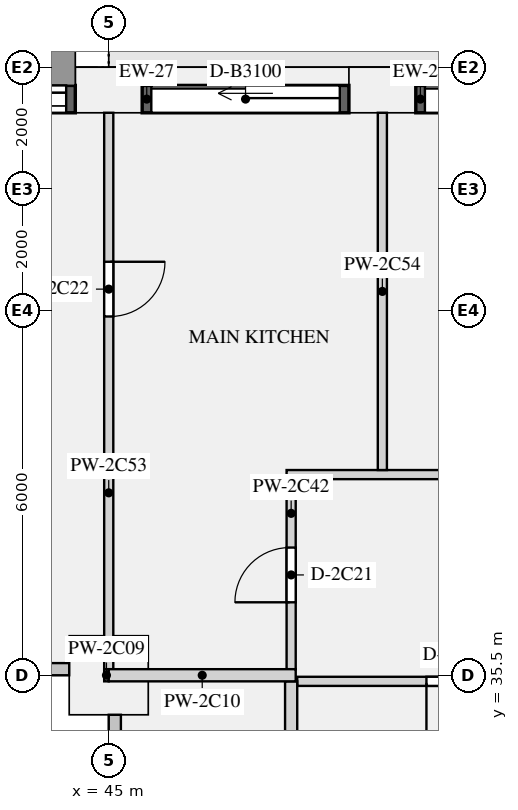
"""IFC4 building model, lengths in metres.
Left out: names, types, materials, properties, quantities, classifications, styles, units other than length and angle.
Written with IfcOpenShell. Run it as: python <this file> out.ifc"""

import sys

from ifc_helpers import new_model, si_unit, direction, frame, frame_2d, origin, origin_2d, place, context, subcontext, project, spatial, rectangle, extrude, element, fill, save


model = new_model("IFC4")
c1 = context("Model", 3, precision=1e-05, world=origin(), true_north=direction((0.0, 1.0)))
c2 = subcontext(c1, "Body", "Model", "MODEL_VIEW")
j1 = project(units=[si_unit("LENGTHUNIT", "METRE"), si_unit("PLANEANGLEUNIT", "RADIAN")], contexts=[c1])
p1 = place(None, origin())
s1 = spatial("IfcSite", under=j1, at=p1, CompositionType="ELEMENT")
p2 = place(p1, origin())
s2 = spatial("IfcBuilding", under=s1, at=p2, CompositionType="ELEMENT")
p3 = place(p2, frame((0.0, 0.0, 102.45)))
s3 = spatial("IfcBuildingStorey", under=s2, at=p3, CompositionType="ELEMENT", Elevation=102.45)
for number, where, z_axis, x_axis in (
    (1, (49.5, 45.125, 0.0), (0.0, 0.0, 1.0), (-1.0, 0.0, 0.0)),
    (2, (45.0, 45.125, 0.0), (0.0, 0.0, 1.0), (-1.0, 0.0, 0.0)),
):
    element("IfcColumn", number, at=place(p3, frame(where, z_axis=z_axis, x_axis=x_axis)), inside=s3, PredefinedType="USERDEFINED", context=c2, shape_type="SweptSolid", body=[
        extrude(rectangle(XDim=1.1, YDim=0.75, at=origin_2d()), origin(), (0.0, 0.0, 1.0), 3.15),
    ])
p4 = place(p3, frame((45.0, 35.5, 0.0), z_axis=(0.0, 0.0, 1.0), x_axis=(1.0, 0.0, 0.0)))
e3 = element("IfcColumn", 3, at=p4, inside=s3, PredefinedType="COLUMN", context=c2, shape_type="SweptSolid", body=[
    extrude(rectangle(XDim=1.3, YDim=1.3, at=origin_2d()), origin(), (0.0, 0.0, 1.0), 3.15),
])
p5 = place(p3, frame((53.45, 44.975, 0.0), z_axis=(0.0, 0.0, 1.0), x_axis=(-1.0, 0.0, 0.0)))
e4 = element("IfcWall", 4, at=p5, inside=s3, PredefinedType="SOLIDWALL", context=c2, shape_type="SweptSolid", body=[
    extrude(rectangle(XDim=3.4, YDim=0.45, at=frame_2d((1.7, 0.0))), origin(), (0.0, 0.0, 1.0), 2.83),
])
p6 = place(p5, frame((0.15, 0.0, 0.0)))
e5 = element("IfcOpeningElement", 5, at=p6, cuts=e4, PredefinedType="OPENING", context=c2, shape_type="SweptSolid", body=[
    extrude(rectangle(XDim=3.1, YDim=2.3, at=frame_2d((1.55, 1.15))), frame((0.0, 0.235, 0.0), z_axis=(0.0, -1.0, 0.0), x_axis=(1.0, 0.0, 0.0)), (0.0, 0.0, 1.0), 0.47),
])
p7 = place(p3, frame((48.95, 44.975, 0.0), z_axis=(0.0, 0.0, 1.0), x_axis=(-1.0, 0.0, 0.0)))
e6 = element("IfcWall", 6, at=p7, inside=s3, PredefinedType="SOLIDWALL", context=c2, shape_type="SweptSolid", body=[
    extrude(rectangle(XDim=3.4, YDim=0.45, at=frame_2d((1.7, 0.0))), origin(), (0.0, 0.0, 1.0), 2.83),
])
p8 = place(p7, frame((0.15, 0.0, 0.0)))
e7 = element("IfcOpeningElement", 7, at=p8, cuts=e6, PredefinedType="OPENING", context=c2, shape_type="SweptSolid", body=[
    extrude(rectangle(XDim=3.1, YDim=2.3, at=frame_2d((1.55, 1.15))), frame((0.0, 0.235, 0.0), z_axis=(0.0, -1.0, 0.0), x_axis=(1.0, 0.0, 0.0)), (0.0, 0.0, 1.0), 0.47),
])
p9 = place(p3, frame((44.45, 44.975, 0.9), z_axis=(0.0, 0.0, 1.0), x_axis=(-1.0, 0.0, 0.0)))
e8 = element("IfcWall", 8, at=p9, inside=s3, PredefinedType="SOLIDWALL", context=c2, shape_type="SweptSolid", body=[
    extrude(rectangle(XDim=3.4, YDim=0.45, at=frame_2d((1.7, 0.0))), origin(), (0.0, 0.0, 1.0), 1.93),
])
p10 = place(p9, frame((0.15, 0.0, 0.15)))
e9 = element("IfcOpeningElement", 9, at=p10, cuts=e8, PredefinedType="OPENING", context=c2, shape_type="SweptSolid", body=[
    extrude(rectangle(XDim=3.1, YDim=1.5, at=frame_2d((1.55, 0.75))), frame((0.0, 0.235, 0.0), z_axis=(0.0, -1.0, 0.0), x_axis=(1.0, 0.0, 0.0)), (0.0, 0.0, 1.0), 0.47),
])
p11 = place(p3, frame((44.925, 35.5, 0.0), z_axis=(0.0, 0.0, 1.0), x_axis=(1.0, 0.0, 0.0)))
e10 = element("IfcWall", 10, at=p11, inside=s3, PredefinedType="PARTITIONING", context=c2, shape_type="SweptSolid", body=[
    extrude(rectangle(XDim=0.075, YDim=0.2, at=frame_2d((0.038, 0.0))), origin(), (0.0, 0.0, 1.0), 2.83),
])
p12 = place(p3, frame((45.0, 35.5, 0.0), z_axis=(0.0, 0.0, 1.0), x_axis=(1.0, 0.0, 0.0)))
e11 = element("IfcWall", 11, at=p12, inside=s3, PredefinedType="PARTITIONING", context=c2, shape_type="SweptSolid", body=[
    extrude(rectangle(XDim=3.075, YDim=0.2, at=frame_2d((1.538, 0.0))), origin(), (0.0, 0.0, 1.0), 2.83),
])
p13 = place(p3, frame((48.1, 35.4, 0.0), z_axis=(0.0, 0.0, 1.0), x_axis=(1.0, 0.0, 0.0)))
e12 = element("IfcWall", 12, at=p13, inside=s3, PredefinedType="PARTITIONING", context=c2, shape_type="SweptSolid", body=[
    extrude(rectangle(XDim=8.1, YDim=0.15, at=frame_2d((4.05, 0.0))), origin(), (0.0, 0.0, 1.0), 2.83),
])
p14 = place(p13, frame((2.125, 0.0, 0.0)))
e13 = element("IfcOpeningElement", 13, at=p14, cuts=e12, PredefinedType="OPENING", context=c2, shape_type="SweptSolid", body=[
    extrude(rectangle(XDim=0.9, YDim=2.1, at=frame_2d((0.45, 1.05))), frame((0.0, 0.085, 0.0), z_axis=(0.0, -1.0, 0.0), x_axis=(1.0, 0.0, 0.0)), (0.0, 0.0, 1.0), 0.17),
])
p15 = place(p3, frame((47.925, 38.8, 0.0), z_axis=(0.0, 0.0, 1.0), x_axis=(1.0, 0.0, 0.0)))
e14 = element("IfcWall", 14, at=p15, inside=s3, PredefinedType="PARTITIONING", context=c2, shape_type="SweptSolid", body=[
    extrude(rectangle(XDim=19.475, YDim=0.15, at=frame_2d((9.737, 0.0))), origin(), (0.0, 0.0, 1.0), 2.83),
])
p16 = place(p15, frame((3.375, 0.0, 0.0)))
e15 = element("IfcOpeningElement", 15, at=p16, cuts=e14, PredefinedType="OPENING", context=c2, shape_type="SweptSolid", body=[
    extrude(rectangle(XDim=0.9, YDim=2.1, at=frame_2d((0.45, 1.05))), frame((0.0, 0.085, 0.0), z_axis=(0.0, -1.0, 0.0), x_axis=(1.0, 0.0, 0.0)), (0.0, 0.0, 1.0), 0.17),
])
p17 = place(p15, frame((7.875, 0.0, 0.0)))
e16 = element("IfcOpeningElement", 16, at=p17, cuts=e14, PredefinedType="OPENING", context=c2, shape_type="SweptSolid", body=[
    extrude(rectangle(XDim=0.9, YDim=2.1, at=frame_2d((0.45, 1.05))), frame((0.0, 0.085, 0.0), z_axis=(0.0, -1.0, 0.0), x_axis=(1.0, 0.0, 0.0)), (0.0, 0.0, 1.0), 0.17),
])
p18 = place(p15, frame((16.875, 0.0, 0.0)))
e17 = element("IfcOpeningElement", 17, at=p18, cuts=e14, PredefinedType="OPENING", context=c2, shape_type="SweptSolid", body=[
    extrude(rectangle(XDim=0.9, YDim=2.1, at=frame_2d((0.45, 1.05))), frame((0.0, 0.085, 0.0), z_axis=(0.0, -1.0, 0.0), x_axis=(1.0, 0.0, 0.0)), (0.0, 0.0, 1.0), 0.17),
])
p19 = place(p3, frame((48.0, 35.6, 0.0), z_axis=(0.0, 0.0, 1.0), x_axis=(0.0, 1.0, 0.0)))
e18 = element("IfcWall", 18, at=p19, inside=s3, PredefinedType="PARTITIONING", context=c2, shape_type="SweptSolid", body=[
    extrude(rectangle(XDim=3.125, YDim=0.15, at=frame_2d((1.562, 0.0))), origin(), (0.0, 0.0, 1.0), 2.83),
])
p20 = place(p19, frame((1.1, 0.0, 0.0)))
e19 = element("IfcOpeningElement", 19, at=p20, cuts=e18, PredefinedType="OPENING", context=c2, shape_type="SweptSolid", body=[
    extrude(rectangle(XDim=0.9, YDim=2.1, at=frame_2d((0.45, 1.05))), frame((0.0, 0.085, 0.0), z_axis=(0.0, -1.0, 0.0), x_axis=(1.0, 0.0, 0.0)), (0.0, 0.0, 1.0), 0.17),
])
p21 = place(p3, frame((48.0, 27.1, 0.0), z_axis=(0.0, 0.0, 1.0), x_axis=(0.0, 1.0, 0.0)))
e20 = element("IfcWall", 20, at=p21, inside=s3, PredefinedType="PARTITIONING", context=c2, shape_type="SweptSolid", body=[
    extrude(rectangle(XDim=8.3, YDim=0.2, at=frame_2d((4.15, 0.0))), origin(), (0.0, 0.0, 1.0), 2.83),
])
p22 = place(p21, frame((4.35, 0.0, 0.0)))
e21 = element("IfcOpeningElement", 21, at=p22, cuts=e20, PredefinedType="OPENING", context=c2, shape_type="SweptSolid", body=[
    extrude(rectangle(XDim=1.1, YDim=2.1, at=frame_2d((0.55, 1.05))), frame((0.0, 0.11, 0.0), z_axis=(0.0, -1.0, 0.0), x_axis=(1.0, 0.0, 0.0)), (0.0, 0.0, 1.0), 0.22),
])
p23 = place(p3, frame((45.0, 35.6, 0.0), z_axis=(0.0, 0.0, 1.0), x_axis=(0.0, 1.0, 0.0)))
e22 = element("IfcWall", 22, at=p23, inside=s3, PredefinedType="PARTITIONING", context=c2, shape_type="SweptSolid", body=[
    extrude(rectangle(XDim=9.15, YDim=0.15, at=frame_2d((4.575, 0.0))), origin(), (0.0, 0.0, 1.0), 2.83),
])
p24 = place(p23, frame((5.8, 0.0, 0.0)))
e23 = element("IfcOpeningElement", 23, at=p24, cuts=e22, PredefinedType="OPENING", context=c2, shape_type="SweptSolid", body=[
    extrude(rectangle(XDim=0.9, YDim=2.1, at=frame_2d((0.45, 1.05))), frame((0.0, 0.085, 0.0), z_axis=(0.0, -1.0, 0.0), x_axis=(1.0, 0.0, 0.0)), (0.0, 0.0, 1.0), 0.17),
])
p25 = place(p3, frame((49.5, 38.875, 0.0), z_axis=(0.0, 0.0, 1.0), x_axis=(0.0, 1.0, 0.0)))
e24 = element("IfcWall", 24, at=p25, inside=s3, PredefinedType="PARTITIONING", context=c2, shape_type="SweptSolid", body=[
    extrude(rectangle(XDim=5.875, YDim=0.15, at=frame_2d((2.938, 0.0))), origin(), (0.0, 0.0, 1.0), 2.83),
])
p26 = place(p6, origin())
e25 = element("IfcDoor", 25, at=p26, inside=s3, OperationType="SLIDING_TO_LEFT", PredefinedType="DOOR", context=c2, shape_type="SweptSolid", body=[
    extrude(rectangle(XDim=3.1, YDim=2.3, at=frame_2d((1.55, 1.15))), frame((0.0, -0.07, 0.0), z_axis=(0.0, -1.0, 0.0), x_axis=(1.0, 0.0, 0.0)), (0.0, 0.0, 1.0), 0.05),
])
fill(e5, e25)
p27 = place(p8, origin())
e26 = element("IfcDoor", 26, at=p27, inside=s3, OperationType="SLIDING_TO_LEFT", PredefinedType="DOOR", context=c2, shape_type="SweptSolid", body=[
    extrude(rectangle(XDim=3.1, YDim=2.3, at=frame_2d((1.55, 1.15))), frame((0.0, -0.07, 0.0), z_axis=(0.0, -1.0, 0.0), x_axis=(1.0, 0.0, 0.0)), (0.0, 0.0, 1.0), 0.05),
])
fill(e7, e26)
p28 = place(p10, origin())
e27 = element("IfcWindow", 27, at=p28, inside=s3, PartitioningType="SINGLE_PANEL", PredefinedType="WINDOW", context=c2, shape_type="SweptSolid", body=[
    extrude(rectangle(XDim=3.1, YDim=1.5, at=frame_2d((1.55, 0.75))), frame((0.0, -0.065, 0.0), z_axis=(0.0, -1.0, 0.0), x_axis=(1.0, 0.0, 0.0)), (0.0, 0.0, 1.0), 0.06),
])
fill(e9, e27)
p29 = place(p14, frame((0.9, 0.0, 0.0), z_axis=(0.0, 0.0, 1.0), x_axis=(-1.0, 0.0, 0.0)))
e28 = element("IfcDoor", 28, at=p29, inside=s3, OperationType="SINGLE_SWING_RIGHT", PredefinedType="DOOR", context=c2, shape_type="SweptSolid", body=[
    extrude(rectangle(XDim=0.9, YDim=2.1, at=frame_2d((0.45, 1.05))), frame((0.0, 0.025, 0.0), z_axis=(0.0, -1.0, 0.0), x_axis=(1.0, 0.0, 0.0)), (0.0, 0.0, 1.0), 0.05),
])
fill(e13, e28)
p30 = place(p20, origin())
e29 = element("IfcDoor", 29, at=p30, inside=s3, OperationType="SINGLE_SWING_LEFT", PredefinedType="DOOR", context=c2, shape_type="SweptSolid", body=[
    extrude(rectangle(XDim=0.9, YDim=2.1, at=frame_2d((0.45, 1.05))), frame((0.0, 0.025, 0.0), z_axis=(0.0, -1.0, 0.0), x_axis=(1.0, 0.0, 0.0)), (0.0, 0.0, 1.0), 0.05),
])
fill(e19, e29)
p31 = place(p24, frame((0.9, 0.0, 0.0), z_axis=(0.0, 0.0, 1.0), x_axis=(-1.0, 0.0, 0.0)))
e30 = element("IfcDoor", 30, at=p31, inside=s3, OperationType="SINGLE_SWING_LEFT", PredefinedType="DOOR", context=c2, shape_type="SweptSolid", body=[
    extrude(rectangle(XDim=0.9, YDim=2.1, at=frame_2d((0.45, 1.05))), frame((0.0, 0.025, 0.0), z_axis=(0.0, -1.0, 0.0), x_axis=(1.0, 0.0, 0.0)), (0.0, 0.0, 1.0), 0.05),
])
fill(e23, e30)
save(model, sys.argv[1])
